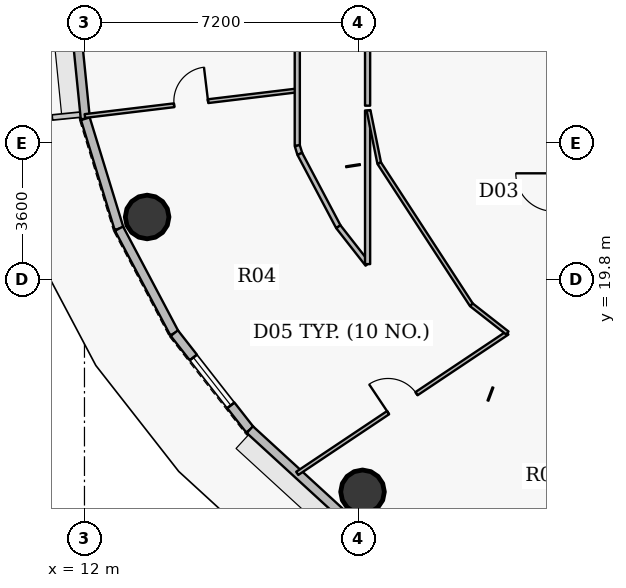
"""IFC4 building model, lengths in metres.
Left out: names, types, materials, properties, quantities, classifications, styles, units other than length and angle.
Written with IfcOpenShell. Run it as: python <this file> out.ifc"""

import sys

from ifc_helpers import new_model, si_unit, direction, frame, frame_2d, origin, origin_2d, place, context, subcontext, project, spatial, rectangle, hollow_circle, extrude, source, transform, mapped, element, fill, save


model = new_model("IFC4")
c1 = context("Model", 3, precision=1e-05, world=origin(), true_north=direction((0.0, 1.0)))
c2 = subcontext(c1, "Body", "Model", "MODEL_VIEW")
j1 = project(units=[si_unit("LENGTHUNIT", "METRE"), si_unit("PLANEANGLEUNIT", "RADIAN")], contexts=[c1])
p1 = place(None, origin())
s1 = spatial("IfcSite", under=j1, at=p1, CompositionType="ELEMENT")
p2 = place(p1, origin())
s2 = spatial("IfcBuilding", under=s1, at=p2, CompositionType="ELEMENT")
p3 = place(p2, frame((0.0, 0.0, 210.3)))
s3 = spatial("IfcBuildingStorey", under=s2, at=p3, CompositionType="ELEMENT", Elevation=210.3)
for number, where, z_axis, x_axis in (
    (1, (13.649, 21.451, -0.25), (0.0, 0.0, 1.0), (1.0, 0.0, 0.0)),
    (2, (19.317, 14.219, -0.25), (0.0, 0.0, 1.0), (1.0, 0.0, 0.0)),
):
    element("IfcColumn", number, at=place(p3, frame(where, z_axis=z_axis, x_axis=x_axis)), inside=s3, PredefinedType="COLUMN", context=c2, shape_type="SweptSolid", body=[
        extrude(hollow_circle(Radius=0.575, WallThickness=0.036, at=origin_2d()), origin(), (0.0, 0.0, 1.0), 4.0),
    ])
p4 = place(p3, frame((12.023, 24.036, 0.0), z_axis=(0.0, 0.0, 1.0), x_axis=(-0.099990595253, 0.994988382274, 0.0)))
e3 = element("IfcWall", 3, at=p4, inside=s3, PredefinedType="SOLIDWALL", context=c2, shape_type="SweptSolid", body=[
    extrude(rectangle(XDim=2.979, YDim=0.24, at=frame_2d((1.489, 0.0))), origin(), (0.0, 0.0, 1.0), 3.5),
])
p5 = place(p3, frame((12.91, 21.144, 0.0), z_axis=(0.0, 0.0, 1.0), x_axis=(-0.293132907334, 0.95607170162, 0.0)))
e4 = element("IfcWall", 4, at=p5, inside=s3, PredefinedType="SOLIDWALL", context=c2, shape_type="SweptSolid", body=[
    extrude(rectangle(XDim=3.025, YDim=0.24, at=frame_2d((1.512, 0.0))), origin(), (0.0, 0.0, 1.0), 3.5),
])
p6 = place(p3, frame((14.364, 18.395, 0.0), z_axis=(0.0, 0.0, 1.0), x_axis=(-0.46766049993, 0.883908172157, 0.0)))
e5 = element("IfcWall", 5, at=p6, inside=s3, PredefinedType="SOLIDWALL", context=c2, shape_type="SweptSolid", body=[
    extrude(rectangle(XDim=3.11, YDim=0.24, at=frame_2d((1.555, 0.0))), origin(), (0.0, 0.0, 1.0), 3.5),
])
p7 = place(p3, frame((16.352, 15.855, 0.0), z_axis=(0.0, 0.0, 1.0), x_axis=(-0.616312344705, 0.787501805562, 0.0)))
e6 = element("IfcWall", 6, at=p7, inside=s3, PredefinedType="SOLIDWALL", context=c2, shape_type="SweptSolid", body=[
    extrude(rectangle(XDim=3.225, YDim=0.24, at=frame_2d((1.612, 0.0))), origin(), (0.0, 0.0, 1.0), 3.5),
])
p8 = place(p7, frame((0.812, 0.0, 0.9)))
e7 = element("IfcOpeningElement", 7, at=p8, cuts=e6, PredefinedType="OPENING", context=c2, shape_type="SweptSolid", body=[
    extrude(rectangle(XDim=1.6, YDim=1.75, at=origin_2d()), frame((0.8, 0.13, 0.875), z_axis=(0.0, -1.0, 0.0), x_axis=(1.0, 0.0, 0.0)), (0.0, 0.0, 1.0), 0.26),
])
p9 = place(p3, frame((18.824, 13.589, 0.0), z_axis=(0.0, 0.0, 1.0), x_axis=(-0.737123922599, 0.675757591694, 0.0)))
e8 = element("IfcWall", 8, at=p9, inside=s3, PredefinedType="SOLIDWALL", context=c2, shape_type="SweptSolid", body=[
    extrude(rectangle(XDim=3.354, YDim=0.24, at=frame_2d((1.677, 0.0))), origin(), (0.0, 0.0, 1.0), 3.5),
])
p10 = place(p3, frame((12.011, 24.108, 0.0), z_axis=(0.0, 0.0, 1.0), x_axis=(0.992811436018, 0.119688982415, 0.0)))
e9 = element("IfcWall", 9, at=p10, inside=s3, PredefinedType="PARTITIONING", context=c2, shape_type="SweptSolid", body=[
    extrude(rectangle(XDim=5.63, YDim=0.1, at=frame_2d((2.815, 0.0))), origin(), (0.0, 0.0, 1.0), 2.985),
])
p11 = place(p10, frame((2.365, 0.0, 0.0)))
e10 = element("IfcOpeningElement", 10, at=p11, cuts=e9, PredefinedType="OPENING", context=c2, shape_type="SweptSolid", body=[
    extrude(rectangle(XDim=0.9, YDim=2.1, at=origin_2d()), frame((0.45, 0.06, 1.05), z_axis=(0.0, -1.0, 0.0), x_axis=(1.0, 0.0, 0.0)), (0.0, 0.0, 1.0), 0.12),
])
p12 = place(p3, frame((17.599, 14.705, 0.0), z_axis=(0.0, 0.0, 1.0), x_axis=(0.831456671534, 0.555589599761, 0.0)))
e11 = element("IfcWall", 11, at=p12, inside=s3, PredefinedType="PARTITIONING", context=c2, shape_type="SweptSolid", body=[
    extrude(rectangle(XDim=6.649, YDim=0.1, at=frame_2d((3.324, 0.0))), origin(), (0.0, 0.0, 1.0), 2.985),
])
p13 = place(p12, frame((2.875, 0.0, 0.0)))
e12 = element("IfcOpeningElement", 12, at=p13, cuts=e11, PredefinedType="OPENING", context=c2, shape_type="SweptSolid", body=[
    extrude(rectangle(XDim=0.9, YDim=2.1, at=origin_2d()), frame((0.45, 0.06, 1.05), z_axis=(0.0, -1.0, 0.0), x_axis=(1.0, 0.0, 0.0)), (0.0, 0.0, 1.0), 0.12),
])
p14 = place(p3, frame((17.6, 23.328, 0.0), z_axis=(0.0, 0.0, 1.0), x_axis=(0.0, 1.0, 0.0)))
e13 = element("IfcWall", 13, at=p14, inside=s3, PredefinedType="PARTITIONING", context=c2, shape_type="SweptSolid", body=[
    extrude(rectangle(XDim=4.622, YDim=0.135, at=frame_2d((2.311, 0.0))), origin(), (0.0, 0.0, 1.0), 2.935),
])
p15 = place(p3, frame((17.6, 23.328, 0.0), z_axis=(0.0, 0.0, 1.0), x_axis=(0.292875000845, -0.956150738053, 0.0)))
e14 = element("IfcWall", 14, at=p15, inside=s3, PredefinedType="PARTITIONING", context=c2, shape_type="SweptSolid", body=[
    extrude(rectangle(XDim=0.227, YDim=0.135, at=frame_2d((0.113, 0.0))), origin(), (0.0, 0.0, 1.0), 3.5),
])
p16 = place(p3, frame((17.667, 23.111, 0.0), z_axis=(0.0, 0.0, 1.0), x_axis=(0.467675622269, -0.883900171024, 0.0)))
e15 = element("IfcWall", 15, at=p16, inside=s3, PredefinedType="PARTITIONING", context=c2, shape_type="SweptSolid", body=[
    extrude(rectangle(XDim=2.168, YDim=0.135, at=frame_2d((1.084, 0.0))), origin(), (0.0, 0.0, 1.0), 2.935),
])
p17 = place(p3, frame((18.681, 21.194, 0.0), z_axis=(0.0, 0.0, 1.0), x_axis=(0.616239706802, -0.787558647823, 0.0)))
e16 = element("IfcWall", 16, at=p17, inside=s3, PredefinedType="PARTITIONING", context=c2, shape_type="SweptSolid", body=[
    extrude(rectangle(XDim=1.248, YDim=0.135, at=frame_2d((0.624, 0.0))), origin(), (0.0, 0.0, 1.0), 3.5),
])
p18 = place(p3, frame((19.45, 20.211, 0.0), z_axis=(0.0, 0.0, 1.0), x_axis=(0.0, 1.0, 0.0)))
e17 = element("IfcWall", 17, at=p18, inside=s3, PredefinedType="PARTITIONING", context=c2, shape_type="SweptSolid", body=[
    extrude(rectangle(XDim=4.042, YDim=0.135, at=frame_2d((2.021, 0.0))), origin(), (0.0, 0.0, 1.0), 2.935),
])
p19 = place(p3, frame((19.45, 24.38, 0.0), z_axis=(0.0, 0.0, 1.0), x_axis=(0.0, 1.0, 0.0)))
e18 = element("IfcWall", 18, at=p19, inside=s3, PredefinedType="PARTITIONING", context=c2, shape_type="SweptSolid", body=[
    extrude(rectangle(XDim=1.67, YDim=0.135, at=frame_2d((0.835, 0.0))), origin(), (0.0, 0.0, 1.0), 3.5),
])
p20 = place(p3, frame((19.475, 24.256, 0.0), z_axis=(0.0, 0.0, 1.0), x_axis=(0.198203790622, -0.980160832406, 0.0)))
e19 = element("IfcWall", 19, at=p20, inside=s3, PredefinedType="PARTITIONING", context=c2, shape_type="SweptSolid", body=[
    extrude(rectangle(XDim=1.417, YDim=0.1, at=frame_2d((0.708, 0.0))), origin(), (0.0, 0.0, 1.0), 2.935),
])
p21 = place(p3, frame((19.756, 22.867, 0.0), z_axis=(0.0, 0.0, 1.0), x_axis=(0.545406924684, -0.83817139447, 0.0)))
e20 = element("IfcWall", 20, at=p21, inside=s3, PredefinedType="PARTITIONING", context=c2, shape_type="SweptSolid", body=[
    extrude(rectangle(XDim=4.448, YDim=0.1, at=frame_2d((2.224, 0.0))), origin(), (0.0, 0.0, 1.0), 2.935),
])
p22 = place(p3, frame((22.182, 19.139, 0.0), z_axis=(0.0, 0.0, 1.0), x_axis=(0.787410607438, -0.616428856636, 0.0)))
e21 = element("IfcWall", 21, at=p22, inside=s3, PredefinedType="PARTITIONING", context=c2, shape_type="SweptSolid", body=[
    extrude(rectangle(XDim=1.201, YDim=0.1, at=frame_2d((0.601, 0.0))), origin(), (0.0, 0.0, 1.0), 3.5),
])
m1 = source(origin(), c2, "Body", "SweptSolid", [
    extrude(rectangle(XDim=1.6, YDim=1.75, at=origin_2d()), frame((0.8, 0.03, 0.875), z_axis=(0.0, -1.0, 0.0), x_axis=(1.0, 0.0, 0.0)), (0.0, 0.0, 1.0), 0.06),
])
p23 = place(p8, origin())
e22 = element("IfcWindow", 22, at=p23, inside=s3, PartitioningType="DOUBLE_PANEL_VERTICAL", PredefinedType="WINDOW", context=c2, shape_type="MappedRepresentation", body=[
    mapped(m1, transform((0.0, 0.0, 0.0), x_axis=(1.0, 0.0, 0.0), y_axis=(0.0, 1.0, 0.0), z_axis=(0.0, 0.0, 1.0), scale=1.0)),
])
fill(e7, e22)
m2 = source(origin(), c2, "Body", "SweptSolid", [
    extrude(rectangle(XDim=0.9, YDim=2.1, at=origin_2d()), frame((0.45, 0.025, 1.05), z_axis=(0.0, -1.0, 0.0), x_axis=(1.0, 0.0, 0.0)), (0.0, 0.0, 1.0), 0.05),
])
p24 = place(p13, origin())
e23 = element("IfcDoor", 23, at=p24, inside=s3, OperationType="SINGLE_SWING_LEFT", PredefinedType="DOOR", context=c2, shape_type="MappedRepresentation", body=[
    mapped(m2, transform((0.0, 0.0, 0.0), x_axis=(1.0, 0.0, 0.0), y_axis=(0.0, 1.0, 0.0), z_axis=(0.0, 0.0, 1.0), scale=1.0)),
])
fill(e12, e23)
p25 = place(p11, origin())
e24 = element("IfcDoor", 24, at=p25, inside=s3, OperationType="SINGLE_SWING_RIGHT", PredefinedType="DOOR", context=c2, shape_type="MappedRepresentation", body=[
    mapped(m2, transform((0.0, 0.0, 0.0), x_axis=(1.0, 0.0, 0.0), y_axis=(0.0, 1.0, 0.0), z_axis=(0.0, 0.0, 1.0), scale=1.0)),
])
fill(e10, e24)
save(model, sys.argv[1])
